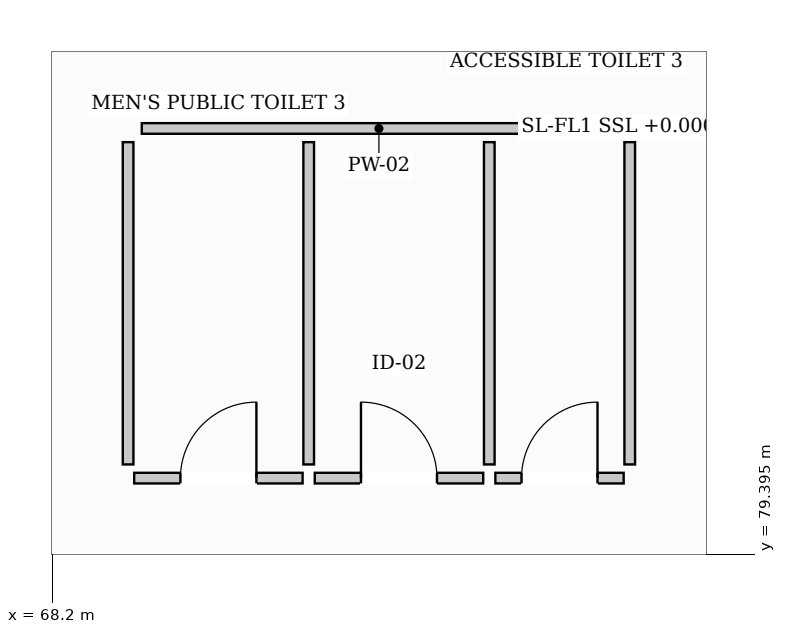
"""IFC4 building model, lengths in metres.
Left out: names, types, materials, properties, quantities, classifications, styles, units other than length and angle.
Written with IfcOpenShell. Run it as: python <this file> out.ifc"""

import sys

from ifc_helpers import new_model, si_unit, direction, frame, frame_2d, origin, place, context, subcontext, project, spatial, rectangle, extrude, element, fill, save


model = new_model("IFC4")
c1 = context("Model", 3, precision=1e-05, world=origin(), true_north=direction((0.0, 1.0)))
c2 = subcontext(c1, "Body", "Model", "MODEL_VIEW")
j1 = project(units=[si_unit("LENGTHUNIT", "METRE"), si_unit("PLANEANGLEUNIT", "RADIAN")], contexts=[c1])
p1 = place(None, origin())
s1 = spatial("IfcSite", under=j1, at=p1, CompositionType="ELEMENT")
p2 = place(p1, origin())
s2 = spatial("IfcBuilding", under=s1, at=p2, CompositionType="ELEMENT")
p3 = place(p2, origin())
s3 = spatial("IfcBuildingStorey", under=s2, at=p3, CompositionType="ELEMENT", Elevation=0.0)
p4 = place(p3, frame((69.38, 85.0, 0.0), z_axis=(0.0, 0.0, 1.0), x_axis=(1.0, 0.0, 0.0)))
e1 = element("IfcWall", 1, at=p4, inside=s3, PredefinedType="PARTITIONING", context=c2, shape_type="SweptSolid", body=[
    extrude(rectangle(XDim=6.24, YDim=0.14, at=frame_2d((3.12, 0.0))), origin(), (0.0, 0.0, 1.0), 4.42),
])
for number, where, z_axis, x_axis in (
    (2, (69.2, 80.58, 0.0), (0.0, 0.0, 1.0), (0.0, 1.0, 0.0)),
    (3, (75.8, 80.58, 0.0), (0.0, 0.0, 1.0), (0.0, 1.0, 0.0)),
    (4, (71.576, 80.58, 0.0), (0.0, 0.0, 1.0), (0.0, 1.0, 0.0)),
    (5, (73.952, 80.58, 0.0), (0.0, 0.0, 1.0), (0.0, 1.0, 0.0)),
):
    element("IfcWall", number, at=place(p3, frame(where, z_axis=z_axis, x_axis=x_axis)), inside=s3, PredefinedType="PARTITIONING", context=c2, shape_type="SweptSolid", body=[
        extrude(rectangle(XDim=4.24, YDim=0.14, at=frame_2d((2.12, 0.0))), origin(), (0.0, 0.0, 1.0), 4.78),
    ])
p5 = place(p3, frame((69.28, 80.4, 0.0), z_axis=(0.0, 0.0, 1.0), x_axis=(1.0, 0.0, 0.0)))
e6 = element("IfcWall", 6, at=p5, inside=s3, PredefinedType="PARTITIONING", context=c2, shape_type="SweptSolid", body=[
    extrude(rectangle(XDim=2.216, YDim=0.14, at=frame_2d((1.108, 0.0))), origin(), (0.0, 0.0, 1.0), 4.78),
])
p6 = place(p5, frame((0.608, 0.0, 0.0)))
e7 = element("IfcOpeningElement", 7, at=p6, cuts=e6, PredefinedType="OPENING", context=c2, shape_type="SweptSolid", body=[
    extrude(rectangle(XDim=1.0, YDim=2.15, at=frame_2d((0.5, 1.075))), frame((0.0, 0.08, 0.0), z_axis=(0.0, -1.0, 0.0), x_axis=(1.0, 0.0, 0.0)), (0.0, 0.0, 1.0), 0.16),
])
p7 = place(p3, frame((71.656, 80.4, 0.0), z_axis=(0.0, 0.0, 1.0), x_axis=(1.0, 0.0, 0.0)))
e8 = element("IfcWall", 8, at=p7, inside=s3, PredefinedType="PARTITIONING", context=c2, shape_type="SweptSolid", body=[
    extrude(rectangle(XDim=2.216, YDim=0.14, at=frame_2d((1.108, 0.0))), origin(), (0.0, 0.0, 1.0), 4.42),
])
p8 = place(p7, frame((0.608, 0.0, 0.0)))
e9 = element("IfcOpeningElement", 9, at=p8, cuts=e8, PredefinedType="OPENING", context=c2, shape_type="SweptSolid", body=[
    extrude(rectangle(XDim=1.0, YDim=2.15, at=frame_2d((0.5, 1.075))), frame((0.0, 0.08, 0.0), z_axis=(0.0, -1.0, 0.0), x_axis=(1.0, 0.0, 0.0)), (0.0, 0.0, 1.0), 0.16),
])
p9 = place(p3, frame((74.032, 80.4, 0.0), z_axis=(0.0, 0.0, 1.0), x_axis=(1.0, 0.0, 0.0)))
e10 = element("IfcWall", 10, at=p9, inside=s3, PredefinedType="PARTITIONING", context=c2, shape_type="SweptSolid", body=[
    extrude(rectangle(XDim=1.688, YDim=0.14, at=frame_2d((0.844, 0.0))), origin(), (0.0, 0.0, 1.0), 4.78),
])
p10 = place(p9, frame((0.344, 0.0, 0.0)))
e11 = element("IfcOpeningElement", 11, at=p10, cuts=e10, PredefinedType="OPENING", context=c2, shape_type="SweptSolid", body=[
    extrude(rectangle(XDim=1.0, YDim=2.15, at=frame_2d((0.5, 1.075))), frame((0.0, 0.08, 0.0), z_axis=(0.0, -1.0, 0.0), x_axis=(1.0, 0.0, 0.0)), (0.0, 0.0, 1.0), 0.16),
])
p11 = place(p6, origin())
e12 = element("IfcDoor", 12, at=p11, inside=s3, OperationType="SINGLE_SWING_RIGHT", PredefinedType="DOOR", context=c2, shape_type="SweptSolid", body=[
    extrude(rectangle(XDim=1.0, YDim=2.15, at=frame_2d((0.5, 1.075))), frame((0.0, 0.025, 0.0), z_axis=(0.0, -1.0, 0.0), x_axis=(1.0, 0.0, 0.0)), (0.0, 0.0, 1.0), 0.05),
])
fill(e7, e12)
p12 = place(p8, origin())
e13 = element("IfcDoor", 13, at=p12, inside=s3, OperationType="SINGLE_SWING_LEFT", PredefinedType="DOOR", context=c2, shape_type="SweptSolid", body=[
    extrude(rectangle(XDim=1.0, YDim=2.15, at=frame_2d((0.5, 1.075))), frame((0.0, 0.025, 0.0), z_axis=(0.0, -1.0, 0.0), x_axis=(1.0, 0.0, 0.0)), (0.0, 0.0, 1.0), 0.05),
])
fill(e9, e13)
p13 = place(p10, origin())
e14 = element("IfcDoor", 14, at=p13, inside=s3, OperationType="SINGLE_SWING_RIGHT", PredefinedType="DOOR", context=c2, shape_type="SweptSolid", body=[
    extrude(rectangle(XDim=1.0, YDim=2.15, at=frame_2d((0.5, 1.075))), frame((0.0, 0.025, 0.0), z_axis=(0.0, -1.0, 0.0), x_axis=(1.0, 0.0, 0.0)), (0.0, 0.0, 1.0), 0.05),
])
fill(e11, e14)
save(model, sys.argv[1])
